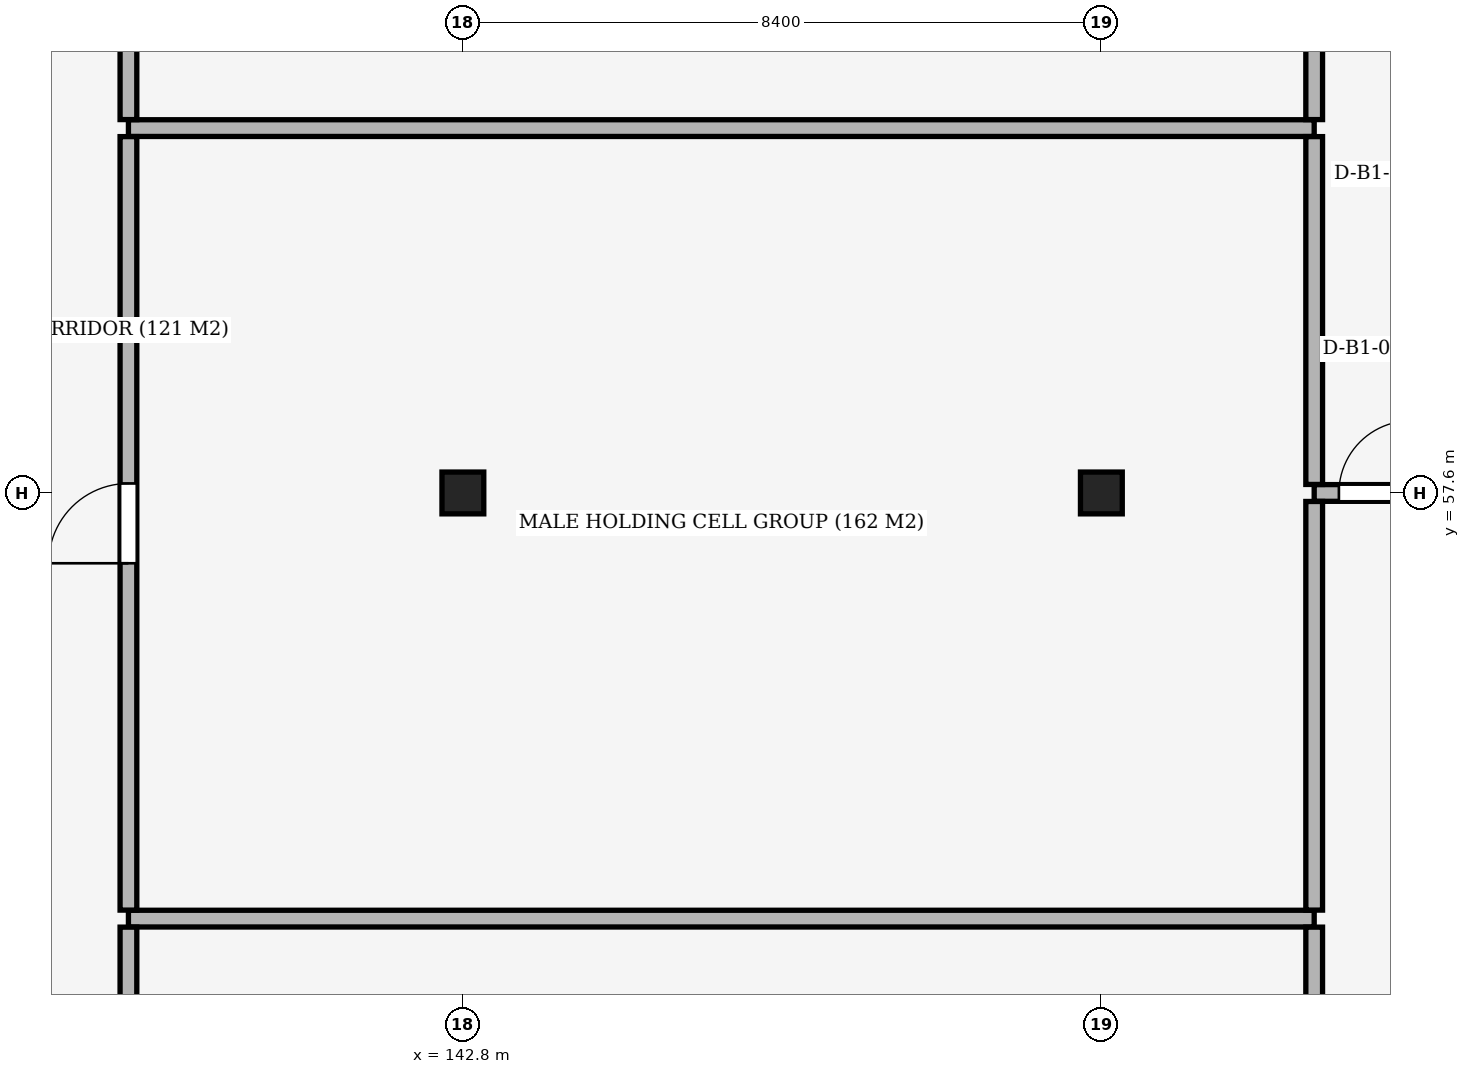
"""IFC4 building model, lengths in metres.
Left out: names, types, materials, properties, quantities, classifications, styles, units other than length and angle.
Written with IfcOpenShell. Run it as: python <this file> out.ifc"""

import sys

from ifc_helpers import new_model, si_unit, direction, frame, frame_2d, origin, origin_2d, place, context, subcontext, project, spatial, rectangle, extrude, element, fill, save


model = new_model("IFC4")
c1 = context("Model", 3, precision=1e-05, world=origin(), true_north=direction((0.0, 1.0)))
c2 = subcontext(c1, "Body", "Model", "MODEL_VIEW")
j1 = project(units=[si_unit("LENGTHUNIT", "METRE"), si_unit("PLANEANGLEUNIT", "RADIAN")], contexts=[c1])
p1 = place(None, origin())
s1 = spatial("IfcSite", under=j1, at=p1, CompositionType="ELEMENT")
p2 = place(p1, origin())
s2 = spatial("IfcBuilding", under=s1, at=p2, CompositionType="ELEMENT")
p3 = place(p2, frame((0.0, 0.0, -4.8)))
s3 = spatial("IfcBuildingStorey", under=s2, at=p3, CompositionType="ELEMENT", Elevation=-4.8)
for number, where, z_axis, x_axis in (
    (1, (142.8, 57.6, 0.0), (0.0, 0.0, 1.0), (1.0, 0.0, 0.0)),
    (2, (151.2, 57.6, 0.0), (0.0, 0.0, 1.0), (1.0, 0.0, 0.0)),
):
    element("IfcColumn", number, at=place(p3, frame(where, z_axis=z_axis, x_axis=x_axis)), inside=s3, PredefinedType="COLUMN", context=c2, shape_type="SweptSolid", body=[
        extrude(rectangle(XDim=0.55, YDim=0.55, at=origin_2d()), origin(), (0.0, 0.0, 1.0), 4.8),
    ])
p4 = place(p3, frame((138.4, 52.0, 0.0), z_axis=(0.0, 0.0, 1.0), x_axis=(1.0, 0.0, 0.0)))
e3 = element("IfcWall", 3, at=p4, inside=s3, PredefinedType="PARTITIONING", context=c2, shape_type="SweptSolid", body=[
    extrude(rectangle(XDim=15.6, YDim=0.22, at=frame_2d((7.8, 0.0))), origin(), (0.0, 0.0, 1.0), 3.7),
])
p5 = place(p3, frame((154.0, 57.6, 0.0), z_axis=(0.0, 0.0, 1.0), x_axis=(1.0, 0.0, 0.0)))
e4 = element("IfcWall", 4, at=p5, inside=s3, PredefinedType="PARTITIONING", context=c2, shape_type="SweptSolid", body=[
    extrude(rectangle(XDim=3.4, YDim=0.22, at=frame_2d((1.7, 0.0))), origin(), (0.0, 0.0, 1.0), 3.7),
])
p6 = place(p5, frame((0.325, 0.0, 0.0)))
e5 = element("IfcOpeningElement", 5, at=p6, cuts=e4, PredefinedType="OPENING", context=c2, shape_type="SweptSolid", body=[
    extrude(rectangle(XDim=0.95, YDim=2.1, at=frame_2d((0.475, 1.05))), frame((0.0, 0.125, 0.0), z_axis=(0.0, -1.0, 0.0), x_axis=(1.0, 0.0, 0.0)), (0.0, 0.0, 1.0), 0.25),
])
p7 = place(p3, frame((138.4, 62.4, 0.0), z_axis=(0.0, 0.0, 1.0), x_axis=(1.0, 0.0, 0.0)))
e6 = element("IfcWall", 6, at=p7, inside=s3, PredefinedType="PARTITIONING", context=c2, shape_type="SweptSolid", body=[
    extrude(rectangle(XDim=15.6, YDim=0.22, at=frame_2d((7.8, 0.0))), origin(), (0.0, 0.0, 1.0), 3.7),
])
p8 = place(p3, frame((138.4, 41.2, 0.0), z_axis=(0.0, 0.0, 1.0), x_axis=(0.0, 1.0, 0.0)))
e7 = element("IfcWall", 7, at=p8, inside=s3, PredefinedType="PARTITIONING", context=c2, shape_type="SweptSolid", body=[
    extrude(rectangle(XDim=10.688, YDim=0.22, at=frame_2d((5.344, 0.0))), origin(), (0.0, 0.0, 1.0), 3.75),
])
p9 = place(p8, frame((4.819, 0.0, 0.0)))
e8 = element("IfcOpeningElement", 8, at=p9, cuts=e7, PredefinedType="OPENING", context=c2, shape_type="SweptSolid", body=[
    extrude(rectangle(XDim=1.05, YDim=2.15, at=frame_2d((0.525, 1.075))), frame((0.0, 0.125, 0.0), z_axis=(0.0, -1.0, 0.0), x_axis=(1.0, 0.0, 0.0)), (0.0, 0.0, 1.0), 0.25),
])
p10 = place(p3, frame((138.4, 52.112, 0.0), z_axis=(0.0, 0.0, 1.0), x_axis=(0.0, 1.0, 0.0)))
e9 = element("IfcWall", 9, at=p10, inside=s3, PredefinedType="PARTITIONING", context=c2, shape_type="SweptSolid", body=[
    extrude(rectangle(XDim=10.176, YDim=0.22, at=frame_2d((5.088, 0.0))), origin(), (0.0, 0.0, 1.0), 3.75),
])
p11 = place(p10, frame((4.563, 0.0, 0.0)))
e10 = element("IfcOpeningElement", 10, at=p11, cuts=e9, PredefinedType="OPENING", context=c2, shape_type="SweptSolid", body=[
    extrude(rectangle(XDim=1.05, YDim=2.15, at=frame_2d((0.525, 1.075))), frame((0.0, 0.125, 0.0), z_axis=(0.0, -1.0, 0.0), x_axis=(1.0, 0.0, 0.0)), (0.0, 0.0, 1.0), 0.25),
])
p12 = place(p3, frame((138.4, 62.512, 0.0), z_axis=(0.0, 0.0, 1.0), x_axis=(0.0, 1.0, 0.0)))
e11 = element("IfcWall", 11, at=p12, inside=s3, PredefinedType="PARTITIONING", context=c2, shape_type="SweptSolid", body=[
    extrude(rectangle(XDim=7.976, YDim=0.22, at=frame_2d((3.988, 0.0))), origin(), (0.0, 0.0, 1.0), 3.75),
])
p13 = place(p3, frame((154.0, 41.052, 0.0), z_axis=(0.0, 0.0, 1.0), x_axis=(0.0, 1.0, 0.0)))
e12 = element("IfcWall", 12, at=p13, inside=s3, PredefinedType="PARTITIONING", context=c2, shape_type="SweptSolid", body=[
    extrude(rectangle(XDim=10.836, YDim=0.22, at=frame_2d((5.418, 0.0))), origin(), (0.0, 0.0, 1.0), 3.9),
])
p14 = place(p3, frame((154.0, 52.112, 0.0), z_axis=(0.0, 0.0, 1.0), x_axis=(0.0, 1.0, 0.0)))
e13 = element("IfcWall", 13, at=p14, inside=s3, PredefinedType="PARTITIONING", context=c2, shape_type="SweptSolid", body=[
    extrude(rectangle(XDim=5.376, YDim=0.22, at=frame_2d((2.688, 0.0))), origin(), (0.0, 0.0, 1.0), 3.9),
])
p15 = place(p3, frame((154.0, 57.712, 0.0), z_axis=(0.0, 0.0, 1.0), x_axis=(0.0, 1.0, 0.0)))
e14 = element("IfcWall", 14, at=p15, inside=s3, PredefinedType="PARTITIONING", context=c2, shape_type="SweptSolid", body=[
    extrude(rectangle(XDim=4.576, YDim=0.22, at=frame_2d((2.288, 0.0))), origin(), (0.0, 0.0, 1.0), 3.9),
])
p16 = place(p3, frame((154.0, 62.512, 0.0), z_axis=(0.0, 0.0, 1.0), x_axis=(0.0, 1.0, 0.0)))
e15 = element("IfcWall", 15, at=p16, inside=s3, PredefinedType="PARTITIONING", context=c2, shape_type="SweptSolid", body=[
    extrude(rectangle(XDim=7.976, YDim=0.22, at=frame_2d((3.988, 0.0))), origin(), (0.0, 0.0, 1.0), 3.9),
])
p17 = place(p6, origin())
e16 = element("IfcDoor", 16, at=p17, inside=s3, OperationType="SINGLE_SWING_RIGHT", PredefinedType="DOOR", context=c2, shape_type="SweptSolid", body=[
    extrude(rectangle(XDim=0.95, YDim=2.1, at=frame_2d((0.475, 1.05))), frame((0.0, 0.025, 0.0), z_axis=(0.0, -1.0, 0.0), x_axis=(1.0, 0.0, 0.0)), (0.0, 0.0, 1.0), 0.05),
])
fill(e5, e16)
p18 = place(p11, origin())
e17 = element("IfcDoor", 17, at=p18, inside=s3, OperationType="SINGLE_SWING_LEFT", PredefinedType="DOOR", context=c2, shape_type="SweptSolid", body=[
    extrude(rectangle(XDim=1.05, YDim=2.15, at=frame_2d((0.525, 1.075))), frame((0.0, 0.025, 0.0), z_axis=(0.0, -1.0, 0.0), x_axis=(1.0, 0.0, 0.0)), (0.0, 0.0, 1.0), 0.05),
])
fill(e10, e17)
save(model, sys.argv[1])
